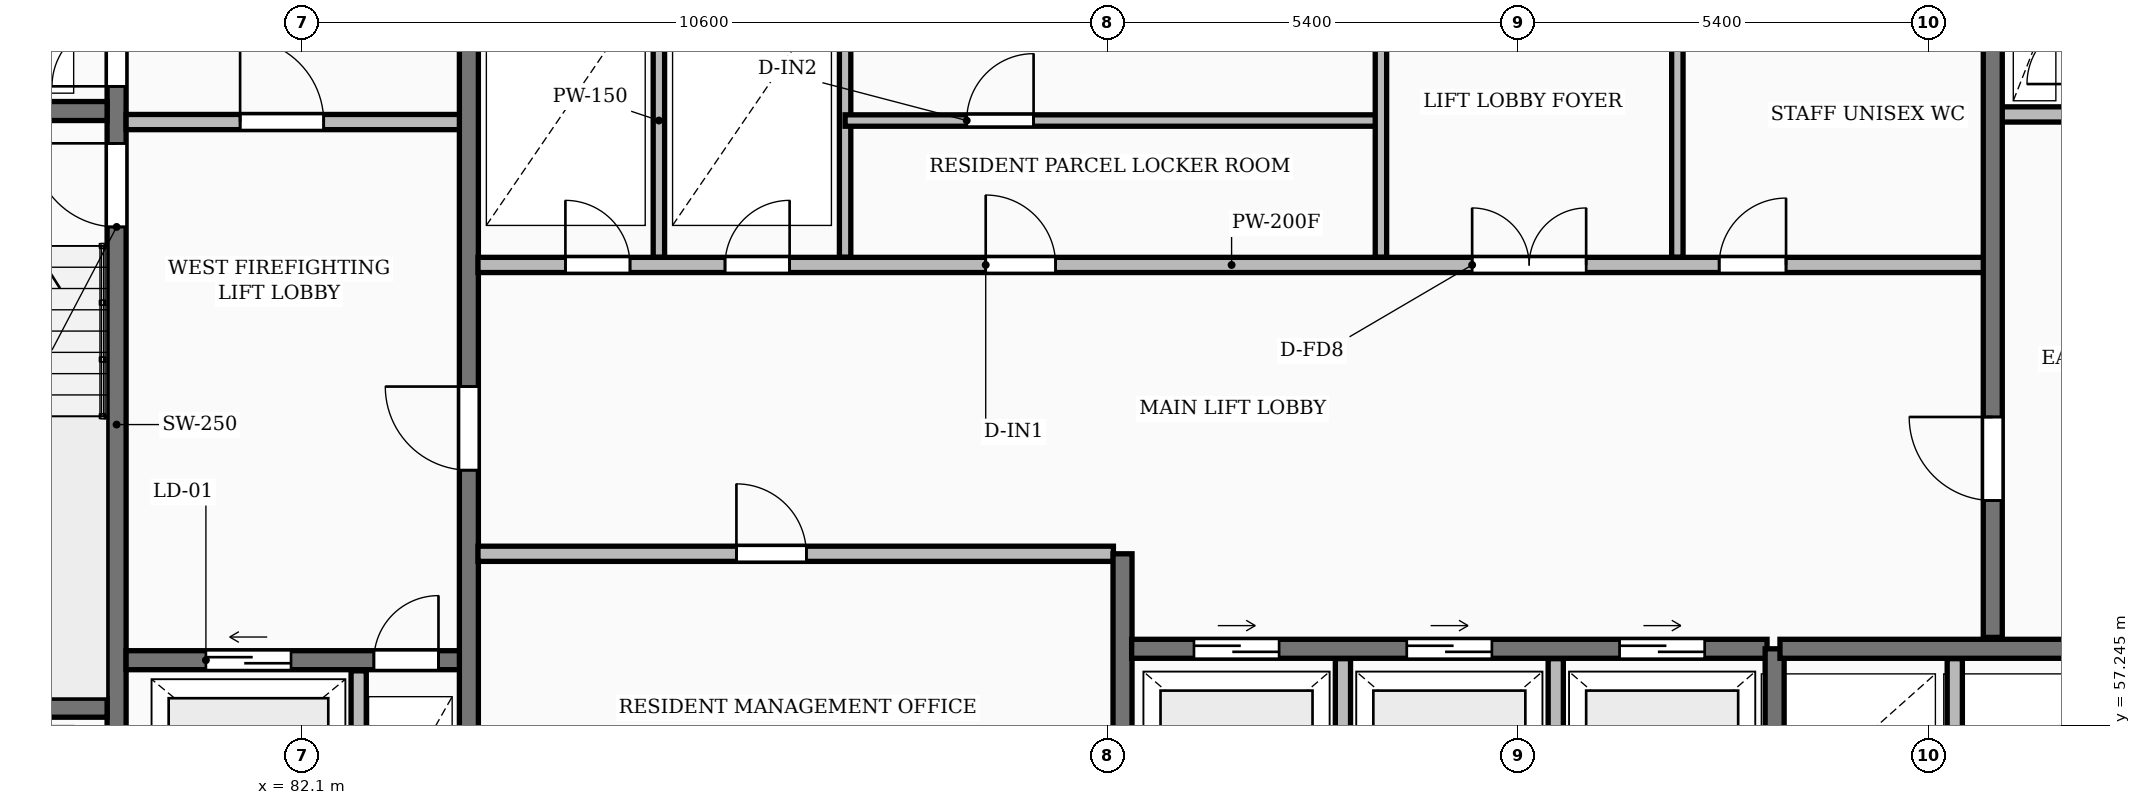
"""IFC4 building model, lengths in metres.
Left out: names, types, materials, properties, quantities, classifications, styles, units other than length and angle.
Written with IfcOpenShell. Run it as: python <this file> out.ifc"""

import sys

from ifc_helpers import new_model, si_unit, direction, frame, frame_2d, origin, place, context, subcontext, project, spatial, rectangle, extrude, element, fill, save


model = new_model("IFC4")
c1 = context("Model", 3, precision=1e-05, world=origin(), true_north=direction((0.0, 1.0)))
c2 = subcontext(c1, "Body", "Model", "MODEL_VIEW")
j1 = project(units=[si_unit("LENGTHUNIT", "METRE"), si_unit("PLANEANGLEUNIT", "RADIAN")], contexts=[c1])
p1 = place(None, origin())
s1 = spatial("IfcSite", under=j1, at=p1, CompositionType="ELEMENT")
p2 = place(p1, origin())
s2 = spatial("IfcBuilding", under=s1, at=p2, CompositionType="ELEMENT")
p3 = place(p2, frame((0.0, 0.0, 165.35)))
s3 = spatial("IfcBuildingStorey", under=s2, at=p3, CompositionType="ELEMENT", Elevation=165.35)
p4 = place(p3, frame((79.665, 55.4, 0.0), z_axis=(0.0, 0.0, 1.0), x_axis=(0.0, 1.0, 0.0)))
e1 = element("IfcWall", 1, at=p4, inside=s3, PredefinedType="SHEAR", context=c2, shape_type="SweptSolid", body=[
    extrude(rectangle(XDim=11.6, YDim=0.25, at=frame_2d((5.8, 0.0))), origin(), (0.0, 0.0, 1.0), 3.25),
])
p5 = place(p4, frame((0.55, 0.0, 0.0)))
e2 = element("IfcOpeningElement", 2, at=p5, cuts=e1, PredefinedType="OPENING", context=c2, shape_type="SweptSolid", body=[
    extrude(rectangle(XDim=0.85, YDim=2.05, at=frame_2d((0.425, 1.025))), frame((0.0, 0.135, 0.0), z_axis=(0.0, -1.0, 0.0), x_axis=(1.0, 0.0, 0.0)), (0.0, 0.0, 1.0), 0.27),
])
p6 = place(p4, frame((8.4, 0.0, 0.0)))
e3 = element("IfcOpeningElement", 3, at=p6, cuts=e1, PredefinedType="OPENING", context=c2, shape_type="SweptSolid", body=[
    extrude(rectangle(XDim=1.1, YDim=2.1, at=frame_2d((0.55, 1.05))), frame((0.0, 0.135, 0.0), z_axis=(0.0, -1.0, 0.0), x_axis=(1.0, 0.0, 0.0)), (0.0, 0.0, 1.0), 0.27),
])
p7 = place(p4, frame((10.25, 0.0, 0.0)))
e4 = element("IfcOpeningElement", 4, at=p7, cuts=e1, PredefinedType="OPENING", context=c2, shape_type="SweptSolid", body=[
    extrude(rectangle(XDim=0.85, YDim=2.05, at=frame_2d((0.425, 1.025))), frame((0.0, 0.135, 0.0), z_axis=(0.0, -1.0, 0.0), x_axis=(1.0, 0.0, 0.0)), (0.0, 0.0, 1.0), 0.27),
])
for number, where, z_axis, x_axis in (
    (5, (76.3, 57.475, 0.0), (0.0, 0.0, 1.0), (1.0, 0.0, 0.0)),
    (6, (76.3, 65.325, 0.0), (0.0, 0.0, 1.0), (1.0, 0.0, 0.0)),
):
    element("IfcWall", number, at=place(p3, frame(where, z_axis=z_axis, x_axis=x_axis)), inside=s3, PredefinedType="SHEAR", context=c2, shape_type="SweptSolid", body=[
        extrude(rectangle(XDim=3.24, YDim=0.25, at=frame_2d((1.62, 0.0))), origin(), (0.0, 0.0, 1.0), 3.25),
    ])
p8 = place(p3, frame((79.79, 58.1, 0.0), z_axis=(0.0, 0.0, 1.0), x_axis=(1.0, 0.0, 0.0)))
e7 = element("IfcWall", 7, at=p8, inside=s3, PredefinedType="SHEAR", context=c2, shape_type="SweptSolid", body=[
    extrude(rectangle(XDim=4.39, YDim=0.25, at=frame_2d((2.195, 0.0))), origin(), (0.0, 0.0, 1.0), 3.25),
])
p9 = place(p8, frame((1.05, 0.0, 0.0)))
e8 = element("IfcOpeningElement", 8, at=p9, cuts=e7, PredefinedType="OPENING", context=c2, shape_type="SweptSolid", body=[
    extrude(rectangle(XDim=1.12, YDim=2.12, at=frame_2d((0.56, 1.06))), frame((0.0, 0.135, 0.0), z_axis=(0.0, -1.0, 0.0), x_axis=(1.0, 0.0, 0.0)), (0.0, 0.0, 1.0), 0.27),
])
p10 = place(p8, frame((3.26, 0.0, 0.0)))
e9 = element("IfcOpeningElement", 9, at=p10, cuts=e7, PredefinedType="OPENING", context=c2, shape_type="SweptSolid", body=[
    extrude(rectangle(XDim=0.85, YDim=2.05, at=frame_2d((0.425, 1.025))), frame((0.0, 0.135, 0.0), z_axis=(0.0, -1.0, 0.0), x_axis=(1.0, 0.0, 0.0)), (0.0, 0.0, 1.0), 0.27),
])
p11 = place(p3, frame((82.85, 55.4, 0.0), z_axis=(0.0, 0.0, 1.0), x_axis=(0.0, 1.0, 0.0)))
e10 = element("IfcWall", 10, at=p11, inside=s3, PredefinedType="PARTITIONING", context=c2, shape_type="SweptSolid", body=[
    extrude(rectangle(XDim=2.56, YDim=0.2, at=frame_2d((1.28, 0.0))), origin(), (0.0, 0.0, 1.0), 2.97),
])
p12 = place(p3, frame((79.79, 65.18, 0.0), z_axis=(0.0, 0.0, 1.0), x_axis=(1.0, 0.0, 0.0)))
e11 = element("IfcWall", 11, at=p12, inside=s3, PredefinedType="PARTITIONING", context=c2, shape_type="SweptSolid", body=[
    extrude(rectangle(XDim=4.39, YDim=0.2, at=frame_2d((2.195, 0.0))), origin(), (0.0, 0.0, 1.0), 2.97),
])
p13 = place(p12, frame((1.5, 0.0, 0.0)))
e12 = element("IfcOpeningElement", 12, at=p13, cuts=e11, PredefinedType="OPENING", context=c2, shape_type="SweptSolid", body=[
    extrude(rectangle(XDim=1.1, YDim=2.1, at=frame_2d((0.55, 1.05))), frame((0.0, 0.11, 0.0), z_axis=(0.0, -1.0, 0.0), x_axis=(1.0, 0.0, 0.0)), (0.0, 0.0, 1.0), 0.22),
])
p14 = place(p3, frame((84.3, 55.4, 0.0), z_axis=(0.0, 0.0, 1.0), x_axis=(0.0, 1.0, 0.0)))
e13 = element("IfcWall", 13, at=p14, inside=s3, PredefinedType="SHEAR", context=c2, shape_type="SweptSolid", body=[
    extrude(rectangle(XDim=11.6, YDim=0.25, at=frame_2d((5.8, 0.0))), origin(), (0.0, 0.0, 1.0), 3.25),
])
p15 = place(p14, frame((5.2, 0.0, 0.0)))
e14 = element("IfcOpeningElement", 14, at=p15, cuts=e13, PredefinedType="OPENING", context=c2, shape_type="SweptSolid", body=[
    extrude(rectangle(XDim=1.1, YDim=2.1, at=frame_2d((0.55, 1.05))), frame((0.0, 0.135, 0.0), z_axis=(0.0, -1.0, 0.0), x_axis=(1.0, 0.0, 0.0)), (0.0, 0.0, 1.0), 0.27),
])
p16 = place(p3, frame((84.42, 59.5, 0.0), z_axis=(0.0, 0.0, 1.0), x_axis=(1.0, 0.0, 0.0)))
e15 = element("IfcWall", 15, at=p16, inside=s3, PredefinedType="PARTITIONING", context=c2, shape_type="SweptSolid", body=[
    extrude(rectangle(XDim=8.36, YDim=0.2, at=frame_2d((4.18, 0.0))), origin(), (0.0, 0.0, 1.0), 2.97),
])
p17 = place(p16, frame((3.4, 0.0, 0.0)))
e16 = element("IfcOpeningElement", 16, at=p17, cuts=e15, PredefinedType="OPENING", context=c2, shape_type="SweptSolid", body=[
    extrude(rectangle(XDim=0.92, YDim=2.08, at=frame_2d((0.46, 1.04))), frame((0.0, 0.11, 0.0), z_axis=(0.0, -1.0, 0.0), x_axis=(1.0, 0.0, 0.0)), (0.0, 0.0, 1.0), 0.22),
])
p18 = place(p3, frame((92.9, 55.4, 0.0), z_axis=(0.0, 0.0, 1.0), x_axis=(0.0, 1.0, 0.0)))
e17 = element("IfcWall", 17, at=p18, inside=s3, PredefinedType="SHEAR", context=c2, shape_type="SweptSolid", body=[
    extrude(rectangle(XDim=4.1, YDim=0.25, at=frame_2d((2.05, 0.0))), origin(), (0.0, 0.0, 1.0), 3.25),
])
for number, where, z_axis, x_axis in (
    (18, (95.8, 55.4, 0.0), (0.0, 0.0, 1.0), (0.0, 1.0, 0.0)),
    (19, (98.6, 55.4, 0.0), (0.0, 0.0, 1.0), (0.0, 1.0, 0.0)),
):
    element("IfcWall", number, at=place(p3, frame(where, z_axis=z_axis, x_axis=x_axis)), inside=s3, PredefinedType="PARTITIONING", context=c2, shape_type="SweptSolid", body=[
        extrude(rectangle(XDim=2.72, YDim=0.2, at=frame_2d((1.36, 0.0))), origin(), (0.0, 0.0, 1.0), 2.97),
    ])
p19 = place(p3, frame((93.02, 58.25, 0.0), z_axis=(0.0, 0.0, 1.0), x_axis=(1.0, 0.0, 0.0)))
e20 = element("IfcWall", 20, at=p19, inside=s3, PredefinedType="SHEAR", context=c2, shape_type="SweptSolid", body=[
    extrude(rectangle(XDim=8.36, YDim=0.25, at=frame_2d((4.18, 0.0))), origin(), (0.0, 0.0, 1.0), 3.25),
])
p20 = place(p19, frame((0.82, 0.0, 0.0)))
e21 = element("IfcOpeningElement", 21, at=p20, cuts=e20, PredefinedType="OPENING", context=c2, shape_type="SweptSolid", body=[
    extrude(rectangle(XDim=1.12, YDim=2.12, at=frame_2d((0.56, 1.06))), frame((0.0, 0.135, 0.0), z_axis=(0.0, -1.0, 0.0), x_axis=(1.0, 0.0, 0.0)), (0.0, 0.0, 1.0), 0.27),
])
p21 = place(p19, frame((3.62, 0.0, 0.0)))
e22 = element("IfcOpeningElement", 22, at=p21, cuts=e20, PredefinedType="OPENING", context=c2, shape_type="SweptSolid", body=[
    extrude(rectangle(XDim=1.12, YDim=2.12, at=frame_2d((0.56, 1.06))), frame((0.0, 0.135, 0.0), z_axis=(0.0, -1.0, 0.0), x_axis=(1.0, 0.0, 0.0)), (0.0, 0.0, 1.0), 0.27),
])
p22 = place(p19, frame((6.42, 0.0, 0.0)))
e23 = element("IfcOpeningElement", 23, at=p22, cuts=e20, PredefinedType="OPENING", context=c2, shape_type="SweptSolid", body=[
    extrude(rectangle(XDim=1.12, YDim=2.12, at=frame_2d((0.56, 1.06))), frame((0.0, 0.135, 0.0), z_axis=(0.0, -1.0, 0.0), x_axis=(1.0, 0.0, 0.0)), (0.0, 0.0, 1.0), 0.27),
])
p23 = place(p3, frame((101.48, 55.4, 0.0), z_axis=(0.0, 0.0, 1.0), x_axis=(0.0, 1.0, 0.0)))
e24 = element("IfcWall", 24, at=p23, inside=s3, PredefinedType="SHEAR", context=c2, shape_type="SweptSolid", body=[
    extrude(rectangle(XDim=2.85, YDim=0.25, at=frame_2d((1.425, 0.0))), origin(), (0.0, 0.0, 1.0), 3.25),
])
p24 = place(p3, frame((103.85, 55.4, 0.0), z_axis=(0.0, 0.0, 1.0), x_axis=(0.0, 1.0, 0.0)))
e25 = element("IfcWall", 25, at=p24, inside=s3, PredefinedType="PARTITIONING", context=c2, shape_type="SweptSolid", body=[
    extrude(rectangle(XDim=2.72, YDim=0.2, at=frame_2d((1.36, 0.0))), origin(), (0.0, 0.0, 1.0), 2.97),
])
p25 = place(p3, frame((101.55, 58.25, 0.0), z_axis=(0.0, 0.0, 1.0), x_axis=(1.0, 0.0, 0.0)))
e26 = element("IfcWall", 26, at=p25, inside=s3, PredefinedType="SHEAR", context=c2, shape_type="SweptSolid", body=[
    extrude(rectangle(XDim=4.6, YDim=0.25, at=frame_2d((2.3, 0.0))), origin(), (0.0, 0.0, 1.0), 3.25),
])
for number, where, z_axis, x_axis in (
    (27, (86.8, 63.4, 0.0), (0.0, 0.0, 1.0), (0.0, 1.0, 0.0)),
    (28, (89.25, 63.4, 0.0), (0.0, 0.0, 1.0), (0.0, 1.0, 0.0)),
):
    element("IfcWall", number, at=place(p3, frame(where, z_axis=z_axis, x_axis=x_axis)), inside=s3, PredefinedType="PARTITIONING", context=c2, shape_type="SweptSolid", body=[
        extrude(rectangle(XDim=3.6, YDim=0.15, at=frame_2d((1.8, 0.0))), origin(), (0.0, 0.0, 1.0), 2.97),
    ])
p26 = place(p3, frame((89.25, 65.2, 0.0), z_axis=(0.0, 0.0, 1.0), x_axis=(1.0, 0.0, 0.0)))
e29 = element("IfcWall", 29, at=p26, inside=s3, PredefinedType="PARTITIONING", context=c2, shape_type="SweptSolid", body=[
    extrude(rectangle(XDim=7.05, YDim=0.15, at=frame_2d((3.525, 0.0))), origin(), (0.0, 0.0, 1.0), 2.97),
])
p27 = place(p26, frame((1.6, 0.0, 0.0)))
e30 = element("IfcOpeningElement", 30, at=p27, cuts=e29, PredefinedType="OPENING", context=c2, shape_type="SweptSolid", body=[
    extrude(rectangle(XDim=0.88, YDim=2.06, at=frame_2d((0.44, 1.03))), frame((0.0, 0.085, 0.0), z_axis=(0.0, -1.0, 0.0), x_axis=(1.0, 0.0, 0.0)), (0.0, 0.0, 1.0), 0.17),
])
for number, where, z_axis, x_axis in (
    (31, (96.3, 63.4, 0.0), (0.0, 0.0, 1.0), (0.0, 1.0, 0.0)),
    (32, (100.2, 63.4, 0.0), (0.0, 0.0, 1.0), (0.0, 1.0, 0.0)),
):
    element("IfcWall", number, at=place(p3, frame(where, z_axis=z_axis, x_axis=x_axis)), inside=s3, PredefinedType="PARTITIONING", context=c2, shape_type="SweptSolid", body=[
        extrude(rectangle(XDim=3.6, YDim=0.15, at=frame_2d((1.8, 0.0))), origin(), (0.0, 0.0, 1.0), 2.97),
    ])
p28 = place(p3, frame((84.42, 63.3, 0.0), z_axis=(0.0, 0.0, 1.0), x_axis=(1.0, 0.0, 0.0)))
e33 = element("IfcWall", 33, at=p28, inside=s3, PredefinedType="PARTITIONING", context=c2, shape_type="SweptSolid", body=[
    extrude(rectangle(XDim=19.83, YDim=0.2, at=frame_2d((9.915, 0.0))), origin(), (0.0, 0.0, 1.0), 2.97),
])
p29 = place(p28, frame((1.15, 0.0, 0.0)))
e34 = element("IfcOpeningElement", 34, at=p29, cuts=e33, PredefinedType="OPENING", context=c2, shape_type="SweptSolid", body=[
    extrude(rectangle(XDim=0.85, YDim=2.05, at=frame_2d((0.425, 1.025))), frame((0.0, 0.11, 0.0), z_axis=(0.0, -1.0, 0.0), x_axis=(1.0, 0.0, 0.0)), (0.0, 0.0, 1.0), 0.22),
])
p30 = place(p28, frame((3.25, 0.0, 0.0)))
e35 = element("IfcOpeningElement", 35, at=p30, cuts=e33, PredefinedType="OPENING", context=c2, shape_type="SweptSolid", body=[
    extrude(rectangle(XDim=0.85, YDim=2.05, at=frame_2d((0.425, 1.025))), frame((0.0, 0.11, 0.0), z_axis=(0.0, -1.0, 0.0), x_axis=(1.0, 0.0, 0.0)), (0.0, 0.0, 1.0), 0.22),
])
p31 = place(p28, frame((13.08, 0.0, 0.0)))
e36 = element("IfcOpeningElement", 36, at=p31, cuts=e33, PredefinedType="OPENING", context=c2, shape_type="SweptSolid", body=[
    extrude(rectangle(XDim=1.5, YDim=2.2, at=frame_2d((0.75, 1.1))), frame((0.0, 0.11, 0.0), z_axis=(0.0, -1.0, 0.0), x_axis=(1.0, 0.0, 0.0)), (0.0, 0.0, 1.0), 0.22),
])
p32 = place(p28, frame((6.68, 0.0, 0.0)))
e37 = element("IfcOpeningElement", 37, at=p32, cuts=e33, PredefinedType="OPENING", context=c2, shape_type="SweptSolid", body=[
    extrude(rectangle(XDim=0.92, YDim=2.08, at=frame_2d((0.46, 1.04))), frame((0.0, 0.11, 0.0), z_axis=(0.0, -1.0, 0.0), x_axis=(1.0, 0.0, 0.0)), (0.0, 0.0, 1.0), 0.22),
])
p33 = place(p28, frame((16.33, 0.0, 0.0)))
e38 = element("IfcOpeningElement", 38, at=p33, cuts=e33, PredefinedType="OPENING", context=c2, shape_type="SweptSolid", body=[
    extrude(rectangle(XDim=0.88, YDim=2.06, at=frame_2d((0.44, 1.03))), frame((0.0, 0.11, 0.0), z_axis=(0.0, -1.0, 0.0), x_axis=(1.0, 0.0, 0.0)), (0.0, 0.0, 1.0), 0.22),
])
p34 = place(p3, frame((104.45, 65.28, 0.0), z_axis=(0.0, 0.0, 1.0), x_axis=(1.0, 0.0, 0.0)))
e39 = element("IfcWall", 39, at=p34, inside=s3, PredefinedType="PARTITIONING", context=c2, shape_type="SweptSolid", body=[
    extrude(rectangle(XDim=1.2, YDim=0.2, at=frame_2d((0.6, 0.0))), origin(), (0.0, 0.0, 1.0), 2.97),
])
p35 = place(p3, frame((104.35, 58.4, 0.0), z_axis=(0.0, 0.0, 1.0), x_axis=(0.0, 1.0, 0.0)))
e40 = element("IfcWall", 40, at=p35, inside=s3, PredefinedType="SHEAR", context=c2, shape_type="SweptSolid", body=[
    extrude(rectangle(XDim=8.6, YDim=0.25, at=frame_2d((4.3, 0.0))), origin(), (0.0, 0.0, 1.0), 3.25),
])
p36 = place(p35, frame((1.8, 0.0, 0.0)))
e41 = element("IfcOpeningElement", 41, at=p36, cuts=e40, PredefinedType="OPENING", context=c2, shape_type="SweptSolid", body=[
    extrude(rectangle(XDim=1.1, YDim=2.1, at=frame_2d((0.55, 1.05))), frame((0.0, 0.135, 0.0), z_axis=(0.0, -1.0, 0.0), x_axis=(1.0, 0.0, 0.0)), (0.0, 0.0, 1.0), 0.27),
])
p37 = place(p6, origin())
e42 = element("IfcDoor", 42, at=p37, inside=s3, OperationType="SINGLE_SWING_RIGHT", PredefinedType="DOOR", context=c2, shape_type="SweptSolid", body=[
    extrude(rectangle(XDim=1.1, YDim=2.1, at=frame_2d((0.55, 1.05))), frame((0.0, 0.025, 0.0), z_axis=(0.0, -1.0, 0.0), x_axis=(1.0, 0.0, 0.0)), (0.0, 0.0, 1.0), 0.05),
])
fill(e3, e42)
p38 = place(p7, origin())
e43 = element("IfcDoor", 43, at=p38, inside=s3, OperationType="SINGLE_SWING_LEFT", PredefinedType="DOOR", context=c2, shape_type="SweptSolid", body=[
    extrude(rectangle(XDim=0.85, YDim=2.05, at=frame_2d((0.425, 1.025))), frame((0.0, 0.025, 0.0), z_axis=(0.0, -1.0, 0.0), x_axis=(1.0, 0.0, 0.0)), (0.0, 0.0, 1.0), 0.05),
])
fill(e4, e43)
p39 = place(p9, origin())
e44 = element("IfcDoor", 44, at=p39, inside=s3, OperationType="SLIDING_TO_LEFT", PredefinedType="DOOR", context=c2, shape_type="SweptSolid", body=[
    extrude(rectangle(XDim=1.12, YDim=2.12, at=frame_2d((0.56, 1.06))), frame((0.0, 0.025, 0.0), z_axis=(0.0, -1.0, 0.0), x_axis=(1.0, 0.0, 0.0)), (0.0, 0.0, 1.0), 0.05),
])
fill(e8, e44)
p40 = place(p10, origin())
e45 = element("IfcDoor", 45, at=p40, inside=s3, OperationType="SINGLE_SWING_RIGHT", PredefinedType="DOOR", context=c2, shape_type="SweptSolid", body=[
    extrude(rectangle(XDim=0.85, YDim=2.05, at=frame_2d((0.425, 1.025))), frame((0.0, 0.025, 0.0), z_axis=(0.0, -1.0, 0.0), x_axis=(1.0, 0.0, 0.0)), (0.0, 0.0, 1.0), 0.05),
])
fill(e9, e45)
p41 = place(p13, origin())
e46 = element("IfcDoor", 46, at=p41, inside=s3, OperationType="SINGLE_SWING_LEFT", PredefinedType="DOOR", context=c2, shape_type="SweptSolid", body=[
    extrude(rectangle(XDim=1.1, YDim=2.1, at=frame_2d((0.55, 1.05))), frame((0.0, 0.025, 0.0), z_axis=(0.0, -1.0, 0.0), x_axis=(1.0, 0.0, 0.0)), (0.0, 0.0, 1.0), 0.05),
])
fill(e12, e46)
p42 = place(p15, origin())
e47 = element("IfcDoor", 47, at=p42, inside=s3, OperationType="SINGLE_SWING_RIGHT", PredefinedType="DOOR", context=c2, shape_type="SweptSolid", body=[
    extrude(rectangle(XDim=1.1, YDim=2.1, at=frame_2d((0.55, 1.05))), frame((0.0, 0.025, 0.0), z_axis=(0.0, -1.0, 0.0), x_axis=(1.0, 0.0, 0.0)), (0.0, 0.0, 1.0), 0.05),
])
fill(e14, e47)
p43 = place(p17, origin())
e48 = element("IfcDoor", 48, at=p43, inside=s3, OperationType="SINGLE_SWING_LEFT", PredefinedType="DOOR", context=c2, shape_type="SweptSolid", body=[
    extrude(rectangle(XDim=0.92, YDim=2.08, at=frame_2d((0.46, 1.04))), frame((0.0, 0.025, 0.0), z_axis=(0.0, -1.0, 0.0), x_axis=(1.0, 0.0, 0.0)), (0.0, 0.0, 1.0), 0.05),
])
fill(e16, e48)
p44 = place(p20, origin())
e49 = element("IfcDoor", 49, at=p44, inside=s3, OperationType="SLIDING_TO_RIGHT", PredefinedType="DOOR", context=c2, shape_type="SweptSolid", body=[
    extrude(rectangle(XDim=1.12, YDim=2.12, at=frame_2d((0.56, 1.06))), frame((0.0, 0.025, 0.0), z_axis=(0.0, -1.0, 0.0), x_axis=(1.0, 0.0, 0.0)), (0.0, 0.0, 1.0), 0.05),
])
fill(e21, e49)
p45 = place(p21, origin())
e50 = element("IfcDoor", 50, at=p45, inside=s3, OperationType="SLIDING_TO_RIGHT", PredefinedType="DOOR", context=c2, shape_type="SweptSolid", body=[
    extrude(rectangle(XDim=1.12, YDim=2.12, at=frame_2d((0.56, 1.06))), frame((0.0, 0.025, 0.0), z_axis=(0.0, -1.0, 0.0), x_axis=(1.0, 0.0, 0.0)), (0.0, 0.0, 1.0), 0.05),
])
fill(e22, e50)
p46 = place(p22, origin())
e51 = element("IfcDoor", 51, at=p46, inside=s3, OperationType="SLIDING_TO_RIGHT", PredefinedType="DOOR", context=c2, shape_type="SweptSolid", body=[
    extrude(rectangle(XDim=1.12, YDim=2.12, at=frame_2d((0.56, 1.06))), frame((0.0, 0.025, 0.0), z_axis=(0.0, -1.0, 0.0), x_axis=(1.0, 0.0, 0.0)), (0.0, 0.0, 1.0), 0.05),
])
fill(e23, e51)
p47 = place(p27, origin())
e52 = element("IfcDoor", 52, at=p47, inside=s3, OperationType="SINGLE_SWING_RIGHT", PredefinedType="DOOR", context=c2, shape_type="SweptSolid", body=[
    extrude(rectangle(XDim=0.88, YDim=2.06, at=frame_2d((0.44, 1.03))), frame((0.0, 0.025, 0.0), z_axis=(0.0, -1.0, 0.0), x_axis=(1.0, 0.0, 0.0)), (0.0, 0.0, 1.0), 0.05),
])
fill(e30, e52)
p48 = place(p29, origin())
e53 = element("IfcDoor", 53, at=p48, inside=s3, OperationType="SINGLE_SWING_LEFT", PredefinedType="DOOR", context=c2, shape_type="SweptSolid", body=[
    extrude(rectangle(XDim=0.85, YDim=2.05, at=frame_2d((0.425, 1.025))), frame((0.0, 0.025, 0.0), z_axis=(0.0, -1.0, 0.0), x_axis=(1.0, 0.0, 0.0)), (0.0, 0.0, 1.0), 0.05),
])
fill(e34, e53)
p49 = place(p30, origin())
e54 = element("IfcDoor", 54, at=p49, inside=s3, OperationType="SINGLE_SWING_RIGHT", PredefinedType="DOOR", context=c2, shape_type="SweptSolid", body=[
    extrude(rectangle(XDim=0.85, YDim=2.05, at=frame_2d((0.425, 1.025))), frame((0.0, 0.025, 0.0), z_axis=(0.0, -1.0, 0.0), x_axis=(1.0, 0.0, 0.0)), (0.0, 0.0, 1.0), 0.05),
])
fill(e35, e54)
p50 = place(p31, origin())
e55 = element("IfcDoor", 55, at=p50, inside=s3, OperationType="DOUBLE_DOOR_SINGLE_SWING", PredefinedType="DOOR", context=c2, shape_type="SweptSolid", body=[
    extrude(rectangle(XDim=1.5, YDim=2.2, at=frame_2d((0.75, 1.1))), frame((0.0, 0.025, 0.0), z_axis=(0.0, -1.0, 0.0), x_axis=(1.0, 0.0, 0.0)), (0.0, 0.0, 1.0), 0.05),
])
fill(e36, e55)
p51 = place(p32, origin())
e56 = element("IfcDoor", 56, at=p51, inside=s3, OperationType="SINGLE_SWING_LEFT", PredefinedType="DOOR", context=c2, shape_type="SweptSolid", body=[
    extrude(rectangle(XDim=0.92, YDim=2.08, at=frame_2d((0.46, 1.04))), frame((0.0, 0.025, 0.0), z_axis=(0.0, -1.0, 0.0), x_axis=(1.0, 0.0, 0.0)), (0.0, 0.0, 1.0), 0.05),
])
fill(e37, e56)
p52 = place(p33, origin())
e57 = element("IfcDoor", 57, at=p52, inside=s3, OperationType="SINGLE_SWING_RIGHT", PredefinedType="DOOR", context=c2, shape_type="SweptSolid", body=[
    extrude(rectangle(XDim=0.88, YDim=2.06, at=frame_2d((0.44, 1.03))), frame((0.0, 0.025, 0.0), z_axis=(0.0, -1.0, 0.0), x_axis=(1.0, 0.0, 0.0)), (0.0, 0.0, 1.0), 0.05),
])
fill(e38, e57)
p53 = place(p36, origin())
e58 = element("IfcDoor", 58, at=p53, inside=s3, OperationType="SINGLE_SWING_RIGHT", PredefinedType="DOOR", context=c2, shape_type="SweptSolid", body=[
    extrude(rectangle(XDim=1.1, YDim=2.1, at=frame_2d((0.55, 1.05))), frame((0.0, 0.025, 0.0), z_axis=(0.0, -1.0, 0.0), x_axis=(1.0, 0.0, 0.0)), (0.0, 0.0, 1.0), 0.05),
])
fill(e41, e58)
save(model, sys.argv[1])
